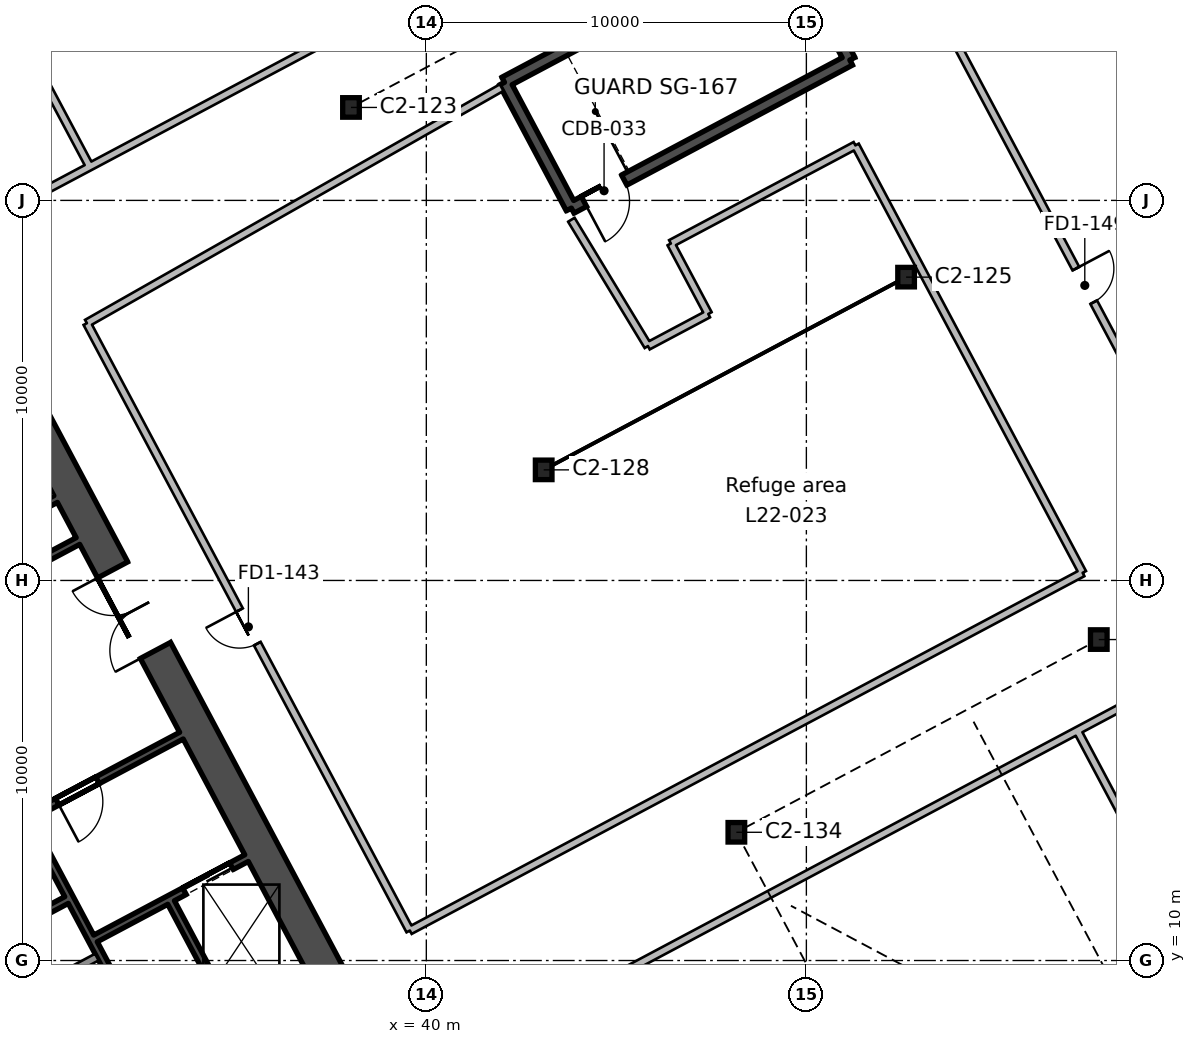
"""IFC4 building model, lengths in metres.
Left out: names, types, materials, properties, quantities, classifications, styles, units other than length and angle.
Written with IfcOpenShell. Run it as: python <this file> out.ifc"""

import sys

from ifc_helpers import new_model, si_unit, direction, frame, frame_2d, origin, origin_2d, place, context, subcontext, project, spatial, rectangle, i_section, extrude, element, fill, save


model = new_model("IFC4")
c1 = context("Model", 3, precision=1e-05, world=origin(), true_north=direction((0.0, 1.0)))
c2 = subcontext(c1, "Body", "Model", "MODEL_VIEW")
j1 = project(units=[si_unit("LENGTHUNIT", "METRE"), si_unit("PLANEANGLEUNIT", "RADIAN")], contexts=[c1])
p1 = place(None, origin())
s1 = spatial("IfcSite", under=j1, at=p1, CompositionType="ELEMENT")
p2 = place(p1, origin())
s2 = spatial("IfcBuilding", under=s1, at=p2, CompositionType="ELEMENT")
p3 = place(p2, frame((0.0, 0.0, 112.2)))
s3 = spatial("IfcBuildingStorey", under=s2, at=p3, CompositionType="ELEMENT", Elevation=112.2)
for number, where, z_axis, x_axis in (
    (1, (48.158, 13.374, 0.0), (0.0, 0.0, 1.0), (1.0, 0.0, 0.0)),
    (2, (57.694, 18.445, 0.0), (0.0, 0.0, 1.0), (1.0, 0.0, 0.0)),
    (3, (43.088, 22.91, 0.0), (0.0, 0.0, 1.0), (1.0, 0.0, 0.0)),
    (4, (52.624, 27.981, 0.0), (0.0, 0.0, 1.0), (1.0, 0.0, 0.0)),
    (5, (38.018, 32.446, 0.0), (0.0, 0.0, 1.0), (1.0, 0.0, 0.0)),
):
    element("IfcColumn", number, at=place(p3, frame(where, z_axis=z_axis, x_axis=x_axis)), inside=s3, PredefinedType="COLUMN", context=c2, shape_type="SweptSolid", body=[
        extrude(i_section(OverallWidth=0.437, OverallDepth=0.513, WebThickness=0.061, FlangeThickness=0.097, FilletRadius=0.015, at=origin_2d()), origin(), (0.0, 0.0, 1.0), 6.0),
    ])
p4 = place(p3, frame((37.849, 8.799, 0.0), z_axis=(0.0, 0.0, 1.0), x_axis=(-0.469465789982, 0.882950662289, 0.0)))
e6 = element("IfcWall", 6, at=p4, inside=s3, PredefinedType="SHEAR", context=c2, shape_type="SweptSolid", body=[
    extrude(rectangle(XDim=20.0, YDim=0.9, at=frame_2d((10.0, 0.0))), origin(), (0.0, 0.0, 1.0), 6.0),
])
p5 = place(p4, frame((10.6, 0.0, 0.0)))
e7 = element("IfcOpeningElement", 7, at=p5, cuts=e6, PredefinedType="OPENING", context=c2, shape_type="SweptSolid", body=[
    extrude(rectangle(XDim=2.4, YDim=2.4, at=frame_2d((1.2, 1.2))), frame((0.0, 0.46, 0.0), z_axis=(0.0, -1.0, 0.0), x_axis=(1.0, 0.0, 0.0)), (0.0, 0.0, 1.0), 0.92),
])
p6 = place(p3, frame((32.968, 7.223, 0.0), z_axis=(0.0, 0.0, 1.0), x_axis=(-0.469480409012, 0.88294288918, 0.0)))
e8 = element("IfcWall", 8, at=p6, inside=s3, PredefinedType="SHEAR", context=c2, shape_type="SweptSolid", body=[
    extrude(rectangle(XDim=7.3, YDim=0.2, at=frame_2d((3.65, 0.0))), origin(), (0.0, 0.0, 1.0), 6.0),
])
p7 = place(p3, frame((34.999, 8.303, 0.0), z_axis=(0.0, 0.0, 1.0), x_axis=(-0.4694665462, 0.882950260207, 0.0)))
e9 = element("IfcWall", 9, at=p7, inside=s3, PredefinedType="SHEAR", context=c2, shape_type="SweptSolid", body=[
    extrude(rectangle(XDim=3.65, YDim=0.2, at=frame_2d((1.825, 0.0))), origin(), (0.0, 0.0, 1.0), 6.0),
])
p8 = place(p3, frame((26.739, 7.648, 0.0), z_axis=(0.0, 0.0, 1.0), x_axis=(0.882934506056, 0.469496174655, 0.0)))
e10 = element("IfcWall", 10, at=p8, inside=s3, PredefinedType="SOLIDWALL", context=c2, shape_type="SweptSolid", body=[
    extrude(rectangle(XDim=5.2, YDim=0.2, at=frame_2d((2.6, 0.0))), origin(), (0.0, 0.0, 1.0), 6.0),
])
p9 = place(p3, frame((31.296, 10.581, 0.0), z_axis=(0.0, 0.0, 1.0), x_axis=(0.882960433586, 0.469447412093, 0.0)))
e11 = element("IfcWall", 11, at=p9, inside=s3, PredefinedType="SHEAR", context=c2, shape_type="SweptSolid", body=[
    extrude(rectangle(XDim=4.5, YDim=0.2, at=frame_2d((2.25, 0.0))), origin(), (0.0, 0.0, 1.0), 6.0),
])
p10 = place(p9, frame((2.65, 0.0, 0.0)))
e12 = element("IfcOpeningElement", 12, at=p10, cuts=e11, PredefinedType="OPENING", context=c2, shape_type="SweptSolid", body=[
    extrude(rectangle(XDim=1.4, YDim=2.4, at=frame_2d((0.7, 1.2))), frame((0.0, 0.11, 0.0), z_axis=(0.0, -1.0, 0.0), x_axis=(1.0, 0.0, 0.0)), (0.0, 0.0, 1.0), 0.22),
])
p11 = place(p3, frame((25.941, 9.15, 0.0), z_axis=(0.0, 0.0, 1.0), x_axis=(0.882953967957, 0.469459572775, 0.0)))
e13 = element("IfcWall", 13, at=p11, inside=s3, PredefinedType="SHEAR", context=c2, shape_type="SweptSolid", body=[
    extrude(rectangle(XDim=5.2, YDim=0.2, at=frame_2d((2.6, 0.0))), origin(), (0.0, 0.0, 1.0), 6.0),
])
p12 = place(p3, frame((24.726, 11.222, 0.0), z_axis=(0.0, 0.0, 1.0), x_axis=(0.882940221191, 0.469485426614, 0.0)))
e14 = element("IfcWall", 14, at=p12, inside=s3, PredefinedType="SHEAR", context=c2, shape_type="SweptSolid", body=[
    extrude(rectangle(XDim=10.0, YDim=0.2, at=frame_2d((5.0, 0.0))), origin(), (0.0, 0.0, 1.0), 6.0),
])
p13 = place(p12, frame((6.3, 0.0, 0.0)))
e15 = element("IfcOpeningElement", 15, at=p13, cuts=e14, PredefinedType="OPENING", context=c2, shape_type="SweptSolid", body=[
    extrude(rectangle(XDim=1.2, YDim=2.1, at=frame_2d((0.6, 1.05))), frame((0.0, 0.11, 0.0), z_axis=(0.0, -1.0, 0.0), x_axis=(1.0, 0.0, 0.0)), (0.0, 0.0, 1.0), 0.22),
])
p14 = place(p12, frame((2.25, 0.0, 0.0)))
e16 = element("IfcOpeningElement", 16, at=p14, cuts=e14, PredefinedType="OPENING", context=c2, shape_type="SweptSolid", body=[
    extrude(rectangle(XDim=0.9, YDim=2.1, at=frame_2d((0.45, 1.05))), frame((0.0, 0.11, 0.0), z_axis=(0.0, -1.0, 0.0), x_axis=(1.0, 0.0, 0.0)), (0.0, 0.0, 1.0), 0.22),
])
p15 = place(p3, frame((23.769, 17.282, 0.0), z_axis=(0.0, 0.0, 1.0), x_axis=(0.882940221191, 0.469485426614, 0.0)))
e17 = element("IfcWall", 17, at=p15, inside=s3, PredefinedType="SHEAR", context=c2, shape_type="SweptSolid", body=[
    extrude(rectangle(XDim=8.0, YDim=0.2, at=frame_2d((4.0, 0.0))), origin(), (0.0, 0.0, 1.0), 6.0),
])
p16 = place(p3, frame((23.182, 18.385, 0.0), z_axis=(0.0, 0.0, 1.0), x_axis=(0.88295287151, 0.469461634952, 0.0)))
e18 = element("IfcWall", 18, at=p16, inside=s3, PredefinedType="SHEAR", context=c2, shape_type="SweptSolid", body=[
    extrude(rectangle(XDim=8.0, YDim=0.2, at=frame_2d((4.0, 0.0))), origin(), (0.0, 0.0, 1.0), 6.0),
])
p17 = place(p3, frame((49.384, 37.004, 0.0), z_axis=(0.0, 0.0, 1.0), x_axis=(0.46946936446, -0.882948761726, 0.0)))
e19 = element("IfcWall", 19, at=p17, inside=s3, PredefinedType="SHEAR", context=c2, shape_type="SweptSolid", body=[
    extrude(rectangle(XDim=3.75, YDim=0.3, at=frame_2d((1.875, 0.0))), origin(), (0.0, 0.0, 1.0), 6.0),
])
p18 = place(p3, frame((51.145, 33.693, 0.0), z_axis=(0.0, 0.0, 1.0), x_axis=(-0.882945809314, -0.469474917132, 0.0)))
e20 = element("IfcWall", 20, at=p18, inside=s3, PredefinedType="SHEAR", context=c2, shape_type="SweptSolid", body=[
    extrude(rectangle(XDim=8.3, YDim=0.3, at=frame_2d((4.15, 0.0))), origin(), (0.0, 0.0, 1.0), 6.0),
])
p19 = place(p18, frame((6.725, 0.0, 0.0)))
e21 = element("IfcOpeningElement", 21, at=p19, cuts=e20, PredefinedType="OPENING", context=c2, shape_type="SweptSolid", body=[
    extrude(rectangle(XDim=1.2, YDim=2.1, at=frame_2d((0.6, 1.05))), frame((0.0, 0.16, 0.0), z_axis=(0.0, -1.0, 0.0), x_axis=(1.0, 0.0, 0.0)), (0.0, 0.0, 1.0), 0.32),
])
p20 = place(p3, frame((43.816, 29.796, 0.0), z_axis=(0.0, 0.0, 1.0), x_axis=(-0.46946936446, 0.882948761726, 0.0)))
e22 = element("IfcWall", 22, at=p20, inside=s3, PredefinedType="SHEAR", context=c2, shape_type="SweptSolid", body=[
    extrude(rectangle(XDim=3.75, YDim=0.3, at=frame_2d((1.875, 0.0))), origin(), (0.0, 0.0, 1.0), 6.0),
])
p21 = place(p3, frame((42.055, 33.107, 0.0), z_axis=(0.0, 0.0, 1.0), x_axis=(0.882945809314, 0.469474917132, 0.0)))
e23 = element("IfcWall", 23, at=p21, inside=s3, PredefinedType="SHEAR", context=c2, shape_type="SweptSolid", body=[
    extrude(rectangle(XDim=8.3, YDim=0.3, at=frame_2d((4.15, 0.0))), origin(), (0.0, 0.0, 1.0), 6.0),
])
p22 = place(p3, frame((0.0, 14.327, 0.0), z_axis=(0.0, 0.0, 1.0), x_axis=(0.882944972043, 0.46947649179, 0.0)))
e24 = element("IfcWall", 24, at=p22, inside=s3, PredefinedType="PARTITIONING", context=c2, shape_type="SweptSolid", body=[
    extrude(rectangle(XDim=35.482, YDim=0.2, at=frame_2d((17.741, 0.0))), origin(), (0.0, 0.0, 1.0), 5.55),
])
p23 = place(p22, frame((25.65, 0.0, 0.0)))
e25 = element("IfcOpeningElement", 25, at=p23, cuts=e24, PredefinedType="OPENING", context=c2, shape_type="SweptSolid", body=[
    extrude(rectangle(XDim=1.0, YDim=2.1, at=frame_2d((0.5, 1.05))), frame((0.0, 0.11, 0.0), z_axis=(0.0, -1.0, 0.0), x_axis=(1.0, 0.0, 0.0)), (0.0, 0.0, 1.0), 0.22),
])
p24 = place(p22, frame((17.25, 0.0, 0.0)))
e26 = element("IfcOpeningElement", 26, at=p24, cuts=e24, PredefinedType="OPENING", context=c2, shape_type="SweptSolid", body=[
    extrude(rectangle(XDim=1.0, YDim=2.1, at=frame_2d((0.5, 1.05))), frame((0.0, 0.11, 0.0), z_axis=(0.0, -1.0, 0.0), x_axis=(1.0, 0.0, 0.0)), (0.0, 0.0, 1.0), 0.22),
])
p25 = place(p22, frame((8.55, 0.0, 0.0)))
e27 = element("IfcOpeningElement", 27, at=p25, cuts=e24, PredefinedType="OPENING", context=c2, shape_type="SweptSolid", body=[
    extrude(rectangle(XDim=1.0, YDim=2.1, at=frame_2d((0.5, 1.05))), frame((0.0, 0.11, 0.0), z_axis=(0.0, -1.0, 0.0), x_axis=(1.0, 0.0, 0.0)), (0.0, 0.0, 1.0), 0.22),
])
p26 = place(p3, frame((57.135, 16.052, 0.0), z_axis=(0.0, 0.0, 1.0), x_axis=(-0.882947211229, -0.469472280528, 0.0)))
e28 = element("IfcWall", 28, at=p26, inside=s3, PredefinedType="PARTITIONING", context=c2, shape_type="SweptSolid", body=[
    extrude(rectangle(XDim=60.236, YDim=0.2, at=frame_2d((30.118, 0.0))), origin(), (0.0, 0.0, 1.0), 5.55),
])
p27 = place(p26, frame((38.75, 0.0, 0.0)))
e29 = element("IfcOpeningElement", 29, at=p27, cuts=e28, PredefinedType="OPENING", context=c2, shape_type="SweptSolid", body=[
    extrude(rectangle(XDim=1.0, YDim=2.1, at=frame_2d((0.5, 1.05))), frame((0.0, 0.11, 0.0), z_axis=(0.0, -1.0, 0.0), x_axis=(1.0, 0.0, 0.0)), (0.0, 0.0, 1.0), 0.22),
])
p28 = place(p26, frame((29.65, 0.0, 0.0)))
e30 = element("IfcOpeningElement", 30, at=p28, cuts=e28, PredefinedType="OPENING", context=c2, shape_type="SweptSolid", body=[
    extrude(rectangle(XDim=1.0, YDim=2.1, at=frame_2d((0.5, 1.05))), frame((0.0, 0.11, 0.0), z_axis=(0.0, -1.0, 0.0), x_axis=(1.0, 0.0, 0.0)), (0.0, 0.0, 1.0), 0.22),
])
p29 = place(p26, frame((20.85, 0.0, 0.0)))
e31 = element("IfcOpeningElement", 31, at=p29, cuts=e28, PredefinedType="OPENING", context=c2, shape_type="SweptSolid", body=[
    extrude(rectangle(XDim=1.0, YDim=2.1, at=frame_2d((0.5, 1.05))), frame((0.0, 0.11, 0.0), z_axis=(0.0, -1.0, 0.0), x_axis=(1.0, 0.0, 0.0)), (0.0, 0.0, 1.0), 0.22),
])
p30 = place(p3, frame((31.137, 30.902, 0.0), z_axis=(0.0, 0.0, 1.0), x_axis=(-0.469485426614, 0.882940221191, 0.0)))
e32 = element("IfcWall", 32, at=p30, inside=s3, PredefinedType="PARTITIONING", context=c2, shape_type="SweptSolid", body=[
    extrude(rectangle(XDim=5.333, YDim=0.2, at=frame_2d((2.667, 0.0))), origin(), (0.0, 0.0, 1.0), 5.55),
])
p31 = place(p3, frame((31.329, 30.985, 0.0), z_axis=(0.0, 0.0, 1.0), x_axis=(0.882954237751, 0.469459065349, 0.0)))
e33 = element("IfcWall", 33, at=p31, inside=s3, PredefinedType="PARTITIONING", context=c2, shape_type="SweptSolid", body=[
    extrude(rectangle(XDim=21.441, YDim=0.2, at=frame_2d((10.721, 0.0))), origin(), (0.0, 0.0, 1.0), 5.55),
])
p32 = place(p31, frame((10.25, 0.0, 0.0)))
e34 = element("IfcOpeningElement", 34, at=p32, cuts=e33, PredefinedType="OPENING", context=c2, shape_type="SweptSolid", body=[
    extrude(rectangle(XDim=1.0, YDim=2.1, at=frame_2d((0.5, 1.05))), frame((0.0, 0.11, 0.0), z_axis=(0.0, -1.0, 0.0), x_axis=(1.0, 0.0, 0.0)), (0.0, 0.0, 1.0), 0.22),
])
p33 = place(p3, frame((57.128, 16.049, 0.0), z_axis=(0.0, 0.0, 1.0), x_axis=(0.469446762432, -0.882960778994, 0.0)))
e35 = element("IfcWall", 35, at=p33, inside=s3, PredefinedType="PARTITIONING", context=c2, shape_type="SweptSolid", body=[
    extrude(rectangle(XDim=8.551, YDim=0.2, at=frame_2d((4.275, 0.0))), origin(), (0.0, 0.0, 1.0), 5.55),
])
p34 = place(p3, frame((48.541, 15.56, 0.0), z_axis=(0.0, 0.0, 1.0), x_axis=(-0.882933406877, -0.469498241765, 0.0)))
e36 = element("IfcWall", 36, at=p34, inside=s3, PredefinedType="PARTITIONING", context=c2, shape_type="SweptSolid", body=[
    extrude(rectangle(XDim=10.164, YDim=0.2, at=frame_2d((5.082, 0.0))), origin(), (0.0, 0.0, 1.0), 5.55),
])
p35 = place(p3, frame((39.567, 10.788, 0.0), z_axis=(0.0, 0.0, 1.0), x_axis=(-0.469474056812, 0.882946266757, 0.0)))
e37 = element("IfcWall", 37, at=p35, inside=s3, PredefinedType="PARTITIONING", context=c2, shape_type="SweptSolid", body=[
    extrude(rectangle(XDim=18.101, YDim=0.2, at=frame_2d((9.05, 0.0))), origin(), (0.0, 0.0, 1.0), 5.55),
])
p36 = place(p35, frame((8.55, 0.0, 0.0)))
e38 = element("IfcOpeningElement", 38, at=p36, cuts=e37, PredefinedType="OPENING", context=c2, shape_type="SweptSolid", body=[
    extrude(rectangle(XDim=1.0, YDim=2.1, at=frame_2d((0.5, 1.05))), frame((0.0, 0.11, 0.0), z_axis=(0.0, -1.0, 0.0), x_axis=(1.0, 0.0, 0.0)), (0.0, 0.0, 1.0), 0.22),
])
p37 = place(p3, frame((31.069, 26.77, 0.0), z_axis=(0.0, 0.0, 1.0), x_axis=(0.86954617394, 0.493851649168, 0.0)))
e39 = element("IfcWall", 39, at=p37, inside=s3, PredefinedType="PARTITIONING", context=c2, shape_type="SweptSolid", body=[
    extrude(rectangle(XDim=12.55, YDim=0.2, at=frame_2d((6.275, 0.0))), origin(), (0.0, 0.0, 1.0), 5.55),
])
p38 = place(p3, frame((43.816, 29.491, 0.0), z_axis=(0.0, 0.0, 1.0), x_axis=(0.518473208291, -0.855093873376, 0.0)))
e40 = element("IfcWall", 40, at=p38, inside=s3, PredefinedType="PARTITIONING", context=c2, shape_type="SweptSolid", body=[
    extrude(rectangle(XDim=1.325, YDim=0.2, at=frame_2d((0.663, 0.0))), origin(), (0.0, 0.0, 1.0), 5.55),
])
p39 = place(p3, frame((45.831, 26.167, 0.0), z_axis=(0.0, 0.0, 1.0), x_axis=(-0.518386189645, 0.855146629757, 0.0)))
e41 = element("IfcWall", 41, at=p39, inside=s3, PredefinedType="PARTITIONING", context=c2, shape_type="SweptSolid", body=[
    extrude(rectangle(XDim=2.562, YDim=0.2, at=frame_2d((1.281, 0.0))), origin(), (0.0, 0.0, 1.0), 5.55),
])
p40 = place(p3, frame((47.42, 27.012, 0.0), z_axis=(0.0, 0.0, 1.0), x_axis=(-0.882911879422, -0.469538723829, 0.0)))
e42 = element("IfcWall", 42, at=p40, inside=s3, PredefinedType="PARTITIONING", context=c2, shape_type="SweptSolid", body=[
    extrude(rectangle(XDim=1.8, YDim=0.2, at=frame_2d((0.9, 0.0))), origin(), (0.0, 0.0, 1.0), 5.55),
])
p41 = place(p3, frame((46.434, 28.866, 0.0), z_axis=(0.0, 0.0, 1.0), x_axis=(0.882942083458, 0.469481924316, 0.0)))
e43 = element("IfcWall", 43, at=p41, inside=s3, PredefinedType="PARTITIONING", context=c2, shape_type="SweptSolid", body=[
    extrude(rectangle(XDim=5.5, YDim=0.2, at=frame_2d((2.75, 0.0))), origin(), (0.0, 0.0, 1.0), 5.55),
])
p42 = place(p3, frame((51.29, 31.448, 0.0), z_axis=(0.0, 0.0, 1.0), x_axis=(0.469459757109, -0.882953869947, 0.0)))
e44 = element("IfcWall", 44, at=p42, inside=s3, PredefinedType="PARTITIONING", context=c2, shape_type="SweptSolid", body=[
    extrude(rectangle(XDim=12.738, YDim=0.2, at=frame_2d((6.369, 0.0))), origin(), (0.0, 0.0, 1.0), 5.55),
])
p43 = place(p3, frame((57.27, 20.201, 0.0), z_axis=(0.0, 0.0, 1.0), x_axis=(-0.882965394181, -0.469438081837, 0.0)))
e45 = element("IfcWall", 45, at=p43, inside=s3, PredefinedType="PARTITIONING", context=c2, shape_type="SweptSolid", body=[
    extrude(rectangle(XDim=9.886, YDim=0.2, at=frame_2d((4.943, 0.0))), origin(), (0.0, 0.0, 1.0), 5.55),
])
p44 = place(p3, frame((47.42, 27.012, 0.0), z_axis=(0.0, 0.0, 1.0), x_axis=(-0.469489562011, 0.882938022266, 0.0)))
e46 = element("IfcWall", 46, at=p44, inside=s3, PredefinedType="PARTITIONING", context=c2, shape_type="SweptSolid", body=[
    extrude(rectangle(XDim=2.1, YDim=0.2, at=frame_2d((1.05, 0.0))), origin(), (0.0, 0.0, 1.0), 5.55),
])
p45 = place(p3, frame((57.135, 16.052, 0.0), z_axis=(0.0, 0.0, 1.0), x_axis=(0.882890251807, 0.469579389735, 0.0)))
e47 = element("IfcWall", 47, at=p45, inside=s3, PredefinedType="PARTITIONING", context=c2, shape_type="SweptSolid", body=[
    extrude(rectangle(XDim=5.667, YDim=0.2, at=frame_2d((2.833, 0.0))), origin(), (0.0, 0.0, 1.0), 5.55),
])
p46 = place(p3, frame((62.138, 18.713, 0.0), z_axis=(0.0, 0.0, 1.0), x_axis=(-0.469466289279, 0.882950396812, 0.0)))
e48 = element("IfcWall", 48, at=p46, inside=s3, PredefinedType="PARTITIONING", context=c2, shape_type="SweptSolid", body=[
    extrude(rectangle(XDim=20.427, YDim=0.2, at=frame_2d((10.213, 0.0))), origin(), (0.0, 0.0, 1.0), 5.55),
])
p47 = place(p46, frame((9.75, 0.0, 0.0)))
e49 = element("IfcOpeningElement", 49, at=p47, cuts=e48, PredefinedType="OPENING", context=c2, shape_type="SweptSolid", body=[
    extrude(rectangle(XDim=1.0, YDim=2.1, at=frame_2d((0.5, 1.05))), frame((0.0, 0.11, 0.0), z_axis=(0.0, -1.0, 0.0), x_axis=(1.0, 0.0, 0.0)), (0.0, 0.0, 1.0), 0.22),
])
p48 = place(p5, origin())
e50 = element("IfcDoor", 50, at=p48, inside=s3, OperationType="DOUBLE_DOOR_SINGLE_SWING", PredefinedType="DOOR", context=c2, shape_type="SweptSolid", body=[
    extrude(rectangle(XDim=2.4, YDim=2.4, at=frame_2d((1.2, 1.2))), frame((0.0, 0.025, 0.0), z_axis=(0.0, -1.0, 0.0), x_axis=(1.0, 0.0, 0.0)), (0.0, 0.0, 1.0), 0.05),
])
fill(e7, e50)
p49 = place(p13, frame((1.2, 0.0, 0.0), z_axis=(0.0, 0.0, 1.0), x_axis=(-1.0, 0.0, 0.0)))
e51 = element("IfcDoor", 51, at=p49, inside=s3, OperationType="SINGLE_SWING_RIGHT", PredefinedType="DOOR", context=c2, shape_type="SweptSolid", body=[
    extrude(rectangle(XDim=1.2, YDim=2.1, at=frame_2d((0.6, 1.05))), frame((0.0, 0.025, 0.0), z_axis=(0.0, -1.0, 0.0), x_axis=(1.0, 0.0, 0.0)), (0.0, 0.0, 1.0), 0.05),
])
fill(e15, e51)
p50 = place(p10, origin())
e52 = element("IfcDoor", 52, at=p50, inside=s3, OperationType="DOUBLE_DOOR_SLIDING", PredefinedType="DOOR", context=c2, shape_type="SweptSolid", body=[
    extrude(rectangle(XDim=1.4, YDim=2.4, at=frame_2d((0.7, 1.2))), frame((0.0, 0.025, 0.0), z_axis=(0.0, -1.0, 0.0), x_axis=(1.0, 0.0, 0.0)), (0.0, 0.0, 1.0), 0.05),
])
fill(e12, e52)
p51 = place(p19, origin())
e53 = element("IfcDoor", 53, at=p51, inside=s3, OperationType="SINGLE_SWING_RIGHT", PredefinedType="DOOR", context=c2, shape_type="SweptSolid", body=[
    extrude(rectangle(XDim=1.2, YDim=2.1, at=frame_2d((0.6, 1.05))), frame((0.0, 0.025, 0.0), z_axis=(0.0, -1.0, 0.0), x_axis=(1.0, 0.0, 0.0)), (0.0, 0.0, 1.0), 0.05),
])
fill(e21, e53)
p52 = place(p47, frame((1.0, 0.0, 0.0), z_axis=(0.0, 0.0, 1.0), x_axis=(-1.0, 0.0, 0.0)))
e54 = element("IfcDoor", 54, at=p52, inside=s3, OperationType="SINGLE_SWING_LEFT", PredefinedType="DOOR", context=c2, shape_type="SweptSolid", body=[
    extrude(rectangle(XDim=1.0, YDim=2.1, at=frame_2d((0.5, 1.05))), frame((0.0, 0.025, 0.0), z_axis=(0.0, -1.0, 0.0), x_axis=(1.0, 0.0, 0.0)), (0.0, 0.0, 1.0), 0.05),
])
fill(e49, e54)
p53 = place(p36, origin())
e55 = element("IfcDoor", 55, at=p53, inside=s3, OperationType="SINGLE_SWING_RIGHT", PredefinedType="DOOR", context=c2, shape_type="SweptSolid", body=[
    extrude(rectangle(XDim=1.0, YDim=2.1, at=frame_2d((0.5, 1.05))), frame((0.0, 0.025, 0.0), z_axis=(0.0, -1.0, 0.0), x_axis=(1.0, 0.0, 0.0)), (0.0, 0.0, 1.0), 0.05),
])
fill(e38, e55)
save(model, sys.argv[1])
